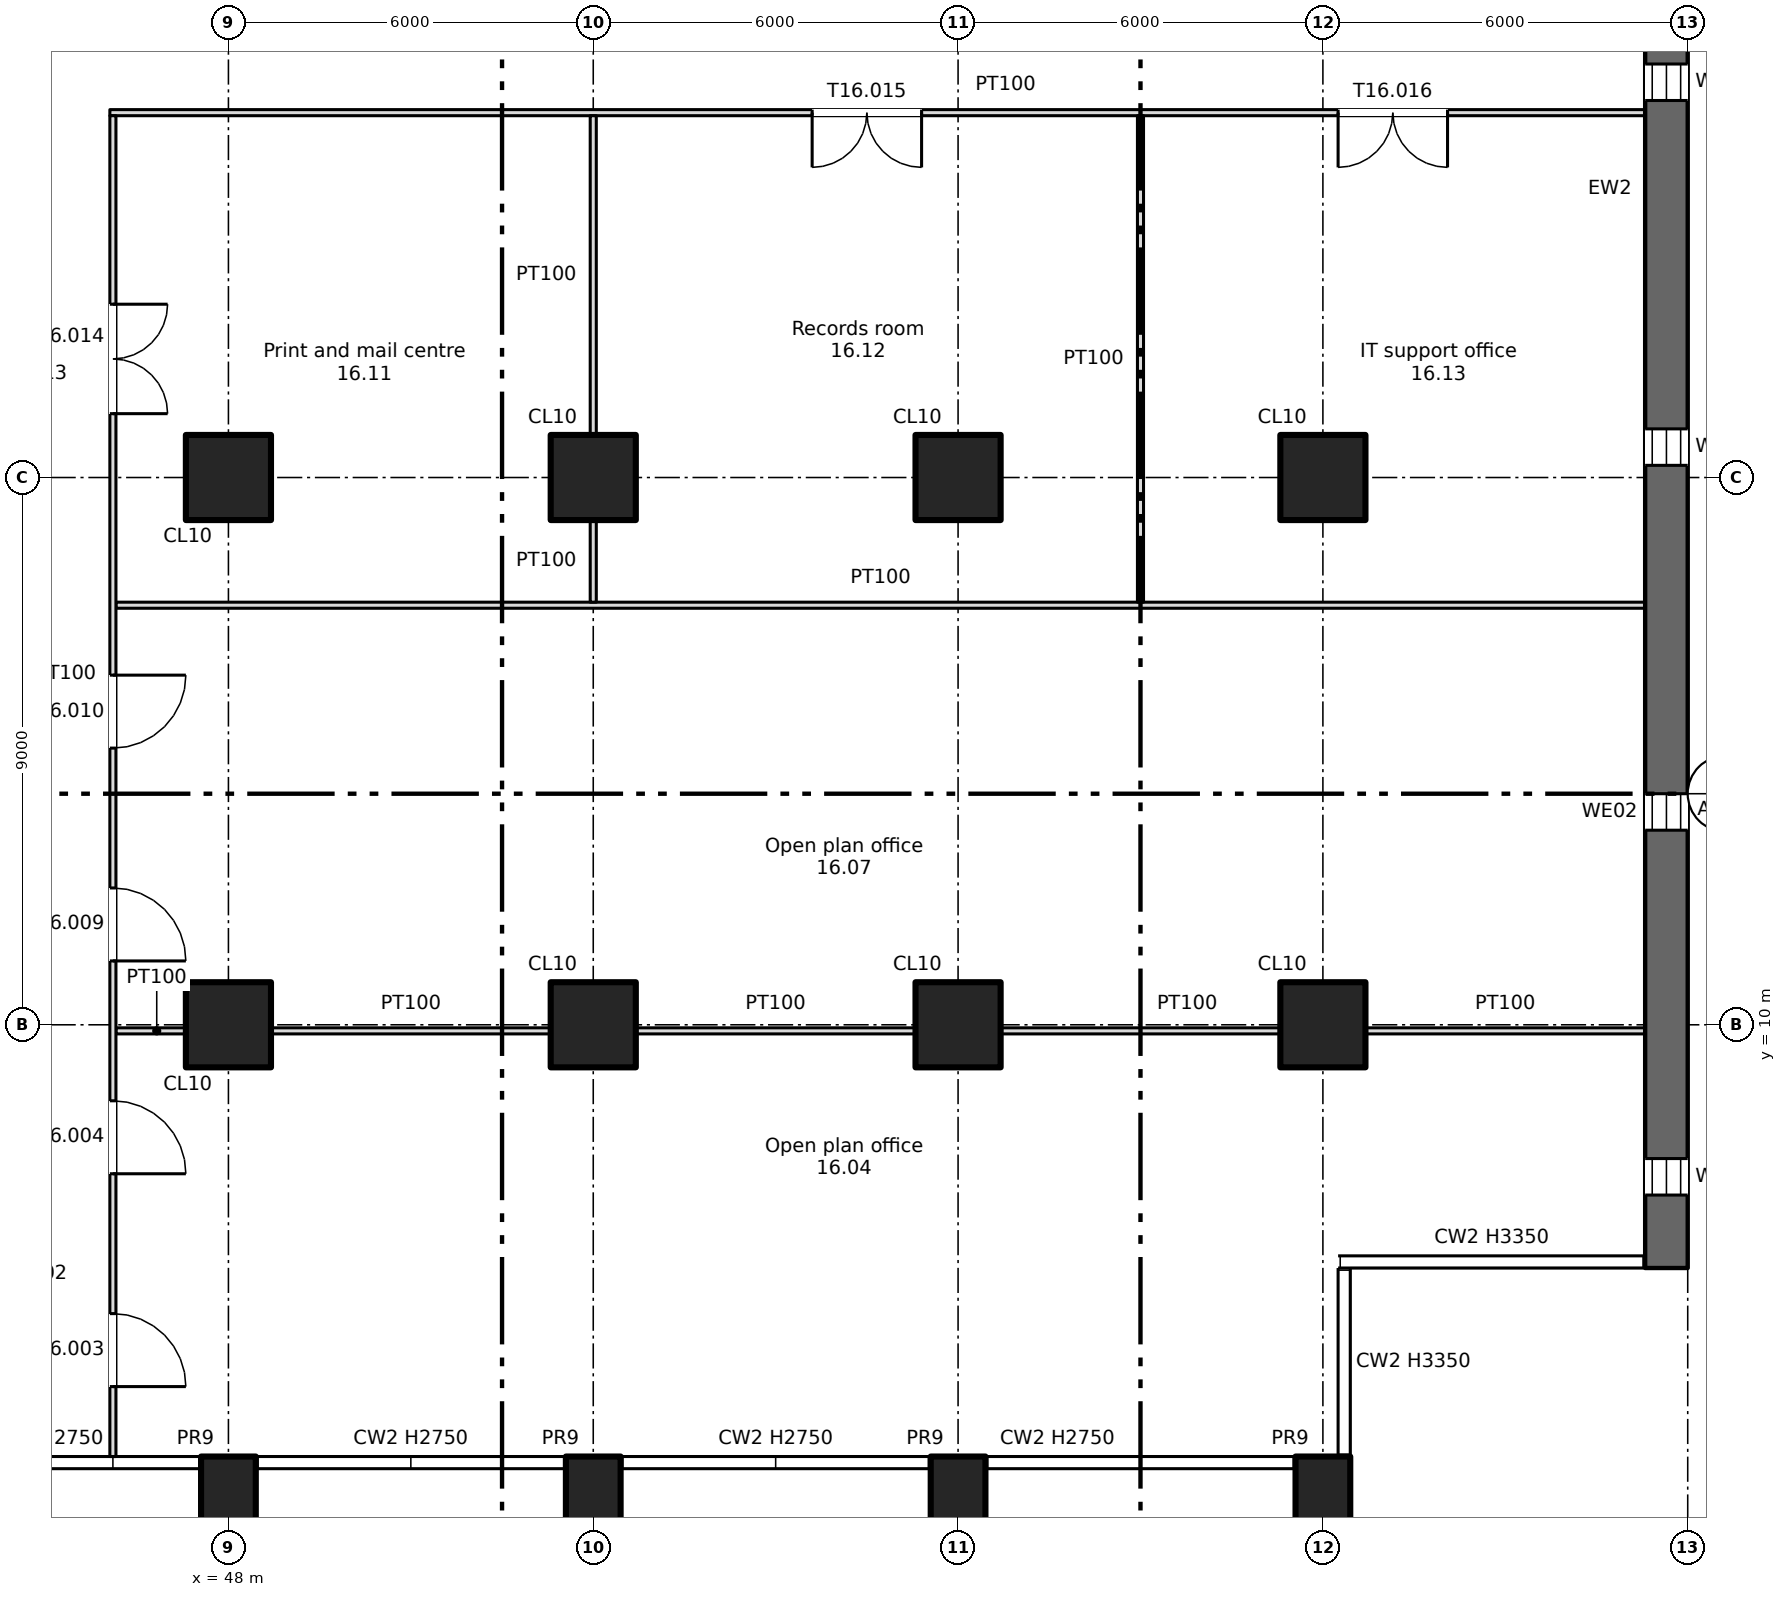
"""IFC4 building model, lengths in metres.
Left out: names, types, materials, properties, quantities, classifications, styles, units other than length and angle.
Written with IfcOpenShell. Run it as: python <this file> out.ifc"""

import sys

from ifc_helpers import new_model, si_unit, direction, frame, frame_2d, origin, origin_2d, place, context, subcontext, project, spatial, rectangle, extrude, element, fill, save


model = new_model("IFC4")
c1 = context("Model", 3, precision=1e-05, world=origin(), true_north=direction((0.0, 1.0)))
c2 = subcontext(c1, "Body", "Model", "MODEL_VIEW")
j1 = project(units=[si_unit("LENGTHUNIT", "METRE"), si_unit("PLANEANGLEUNIT", "RADIAN")], contexts=[c1])
p1 = place(None, origin())
s1 = spatial("IfcSite", under=j1, at=p1, CompositionType="ELEMENT")
p2 = place(p1, origin())
s2 = spatial("IfcBuilding", under=s1, at=p2, CompositionType="ELEMENT")
p3 = place(p2, frame((0.0, 0.0, 102.5)))
s3 = spatial("IfcBuildingStorey", under=s2, at=p3, CompositionType="ELEMENT", Elevation=102.5)
for number, where, z_axis, x_axis in (
    (1, (48.0, 2.2, -0.4), (0.0, 0.0, 1.0), (1.0, 0.0, 0.0)),
    (2, (54.0, 2.2, -0.4), (0.0, 0.0, 1.0), (1.0, 0.0, 0.0)),
    (3, (60.0, 2.2, -0.4), (0.0, 0.0, 1.0), (1.0, 0.0, 0.0)),
    (4, (66.0, 2.2, -0.4), (0.0, 0.0, 1.0), (1.0, 0.0, 0.0)),
):
    element("IfcColumn", number, at=place(p3, frame(where, z_axis=z_axis, x_axis=x_axis)), inside=s3, PredefinedType="COLUMN", context=c2, shape_type="SweptSolid", body=[
        extrude(rectangle(XDim=0.9, YDim=1.4, at=origin_2d()), origin(), (0.0, 0.0, 1.0), 3.75),
    ])
for number, where, z_axis, x_axis in (
    (5, (48.0, 10.0, 0.0), (0.0, 0.0, 1.0), (1.0, 0.0, 0.0)),
    (6, (48.0, 19.0, 0.0), (0.0, 0.0, 1.0), (1.0, 0.0, 0.0)),
    (7, (54.0, 10.0, 0.0), (0.0, 0.0, 1.0), (1.0, 0.0, 0.0)),
    (8, (54.0, 19.0, 0.0), (0.0, 0.0, 1.0), (1.0, 0.0, 0.0)),
    (9, (60.0, 10.0, 0.0), (0.0, 0.0, 1.0), (1.0, 0.0, 0.0)),
    (10, (60.0, 19.0, 0.0), (0.0, 0.0, 1.0), (1.0, 0.0, 0.0)),
    (11, (66.0, 10.0, 0.0), (0.0, 0.0, 1.0), (1.0, 0.0, 0.0)),
    (12, (66.0, 19.0, 0.0), (0.0, 0.0, 1.0), (1.0, 0.0, 0.0)),
):
    element("IfcColumn", number, at=place(p3, frame(where, z_axis=z_axis, x_axis=x_axis)), inside=s3, PredefinedType="COLUMN", context=c2, shape_type="SweptSolid", body=[
        extrude(rectangle(XDim=1.4, YDim=1.4, at=origin_2d()), origin(), (0.0, 0.0, 1.0), 3.35),
    ])
p4 = place(p3, frame((71.65, 6.0, 0.0), z_axis=(0.0, 0.0, 1.0), x_axis=(0.0, 1.0, 0.0)))
e13 = element("IfcWall", 13, at=p4, inside=s3, PredefinedType="SHEAR", context=c2, shape_type="SweptSolid", body=[
    extrude(rectangle(XDim=35.5, YDim=0.7, at=frame_2d((17.75, 0.0))), origin(), (0.0, 0.0, 1.0), 3.35),
])
p5 = place(p4, frame((1.2, 0.0, 0.6)))
e14 = element("IfcOpeningElement", 14, at=p5, cuts=e13, PredefinedType="OPENING", context=c2, shape_type="SweptSolid", body=[
    extrude(rectangle(XDim=0.6, YDim=2.4, at=frame_2d((0.3, 1.2))), frame((0.0, 0.36, 0.0), z_axis=(0.0, -1.0, 0.0), x_axis=(1.0, 0.0, 0.0)), (0.0, 0.0, 1.0), 0.72),
])
p6 = place(p4, frame((7.2, 0.0, 0.6)))
e15 = element("IfcOpeningElement", 15, at=p6, cuts=e13, PredefinedType="OPENING", context=c2, shape_type="SweptSolid", body=[
    extrude(rectangle(XDim=0.6, YDim=2.4, at=frame_2d((0.3, 1.2))), frame((0.0, 0.36, 0.0), z_axis=(0.0, -1.0, 0.0), x_axis=(1.0, 0.0, 0.0)), (0.0, 0.0, 1.0), 0.72),
])
p7 = place(p4, frame((13.2, 0.0, 0.6)))
e16 = element("IfcOpeningElement", 16, at=p7, cuts=e13, PredefinedType="OPENING", context=c2, shape_type="SweptSolid", body=[
    extrude(rectangle(XDim=0.6, YDim=2.4, at=frame_2d((0.3, 1.2))), frame((0.0, 0.36, 0.0), z_axis=(0.0, -1.0, 0.0), x_axis=(1.0, 0.0, 0.0)), (0.0, 0.0, 1.0), 0.72),
])
p8 = place(p4, frame((19.2, 0.0, 0.6)))
e17 = element("IfcOpeningElement", 17, at=p8, cuts=e13, PredefinedType="OPENING", context=c2, shape_type="SweptSolid", body=[
    extrude(rectangle(XDim=0.6, YDim=2.4, at=frame_2d((0.3, 1.2))), frame((0.0, 0.36, 0.0), z_axis=(0.0, -1.0, 0.0), x_axis=(1.0, 0.0, 0.0)), (0.0, 0.0, 1.0), 0.72),
])
p9 = place(p4, frame((25.2, 0.0, 0.6)))
e18 = element("IfcOpeningElement", 18, at=p9, cuts=e13, PredefinedType="OPENING", context=c2, shape_type="SweptSolid", body=[
    extrude(rectangle(XDim=0.6, YDim=2.4, at=frame_2d((0.3, 1.2))), frame((0.0, 0.36, 0.0), z_axis=(0.0, -1.0, 0.0), x_axis=(1.0, 0.0, 0.0)), (0.0, 0.0, 1.0), 0.72),
])
p10 = place(p4, frame((31.2, 0.0, 0.6)))
e19 = element("IfcOpeningElement", 19, at=p10, cuts=e13, PredefinedType="OPENING", context=c2, shape_type="SweptSolid", body=[
    extrude(rectangle(XDim=0.6, YDim=2.4, at=frame_2d((0.3, 1.2))), frame((0.0, 0.36, 0.0), z_axis=(0.0, -1.0, 0.0), x_axis=(1.0, 0.0, 0.0)), (0.0, 0.0, 1.0), 0.72),
])
for number, where, z_axis, x_axis in (
    (20, (66.7, 9.9, 0.0), (0.0, 0.0, 1.0), (1.0, 0.0, 0.0)),
    (21, (60.7, 9.9, 0.0), (0.0, 0.0, 1.0), (1.0, 0.0, 0.0)),
    (22, (54.7, 9.9, 0.0), (0.0, 0.0, 1.0), (1.0, 0.0, 0.0)),
    (23, (48.7, 9.9, 0.0), (0.0, 0.0, 1.0), (1.0, 0.0, 0.0)),
):
    element("IfcWall", number, at=place(p3, frame(where, z_axis=z_axis, x_axis=x_axis)), inside=s3, PredefinedType="PARTITIONING", context=c2, shape_type="SweptSolid", body=[
        extrude(rectangle(XDim=4.6, YDim=0.1, at=frame_2d((2.3, 0.0))), origin(), (0.0, 0.0, 1.0), 3.35),
    ])
p11 = place(p3, frame((46.15, 9.9, 0.0), z_axis=(0.0, 0.0, 1.0), x_axis=(1.0, 0.0, 0.0)))
e24 = element("IfcWall", 24, at=p11, inside=s3, PredefinedType="PARTITIONING", context=c2, shape_type="SweptSolid", body=[
    extrude(rectangle(XDim=1.15, YDim=0.1, at=frame_2d((0.575, 0.0))), origin(), (0.0, 0.0, 1.0), 3.35),
])
p12 = place(p3, frame((46.15, 16.9, 0.0), z_axis=(0.0, 0.0, 1.0), x_axis=(1.0, 0.0, 0.0)))
e25 = element("IfcWall", 25, at=p12, inside=s3, PredefinedType="PARTITIONING", context=c2, shape_type="SweptSolid", body=[
    extrude(rectangle(XDim=25.15, YDim=0.1, at=frame_2d((12.575, 0.0))), origin(), (0.0, 0.0, 1.0), 3.35),
])
p13 = place(p3, frame((46.05, 25.0, 0.0), z_axis=(0.0, 0.0, 1.0), x_axis=(1.0, 0.0, 0.0)))
e26 = element("IfcWall", 26, at=p13, inside=s3, PredefinedType="PARTITIONING", context=c2, shape_type="SweptSolid", body=[
    extrude(rectangle(XDim=25.25, YDim=0.1, at=frame_2d((12.625, 0.0))), origin(), (0.0, 0.0, 1.0), 3.35),
])
p14 = place(p13, frame((11.55, 0.0, 0.0)))
e27 = element("IfcOpeningElement", 27, at=p14, cuts=e26, PredefinedType="OPENING", context=c2, shape_type="SweptSolid", body=[
    extrude(rectangle(XDim=1.8, YDim=2.1, at=frame_2d((0.9, 1.05))), frame((0.0, 0.06, 0.0), z_axis=(0.0, -1.0, 0.0), x_axis=(1.0, 0.0, 0.0)), (0.0, 0.0, 1.0), 0.12),
])
p15 = place(p13, frame((20.2, 0.0, 0.0)))
e28 = element("IfcOpeningElement", 28, at=p15, cuts=e26, PredefinedType="OPENING", context=c2, shape_type="SweptSolid", body=[
    extrude(rectangle(XDim=1.8, YDim=2.1, at=frame_2d((0.9, 1.05))), frame((0.0, 0.06, 0.0), z_axis=(0.0, -1.0, 0.0), x_axis=(1.0, 0.0, 0.0)), (0.0, 0.0, 1.0), 0.12),
])
p16 = place(p3, frame((46.1, 2.9, 0.0), z_axis=(0.0, 0.0, 1.0), x_axis=(0.0, 1.0, 0.0)))
e29 = element("IfcWall", 29, at=p16, inside=s3, PredefinedType="PARTITIONING", context=c2, shape_type="SweptSolid", body=[
    extrude(rectangle(XDim=22.05, YDim=0.1, at=frame_2d((11.025, 0.0))), origin(), (0.0, 0.0, 1.0), 3.35),
])
p17 = place(p16, frame((1.15, 0.0, 0.0)))
e30 = element("IfcOpeningElement", 30, at=p17, cuts=e29, PredefinedType="OPENING", context=c2, shape_type="SweptSolid", body=[
    extrude(rectangle(XDim=1.2, YDim=2.1, at=frame_2d((0.6, 1.05))), frame((0.0, 0.06, 0.0), z_axis=(0.0, -1.0, 0.0), x_axis=(1.0, 0.0, 0.0)), (0.0, 0.0, 1.0), 0.12),
])
p18 = place(p16, frame((4.65, 0.0, 0.0)))
e31 = element("IfcOpeningElement", 31, at=p18, cuts=e29, PredefinedType="OPENING", context=c2, shape_type="SweptSolid", body=[
    extrude(rectangle(XDim=1.2, YDim=2.1, at=frame_2d((0.6, 1.05))), frame((0.0, 0.06, 0.0), z_axis=(0.0, -1.0, 0.0), x_axis=(1.0, 0.0, 0.0)), (0.0, 0.0, 1.0), 0.12),
])
p19 = place(p16, frame((8.15, 0.0, 0.0)))
e32 = element("IfcOpeningElement", 32, at=p19, cuts=e29, PredefinedType="OPENING", context=c2, shape_type="SweptSolid", body=[
    extrude(rectangle(XDim=1.2, YDim=2.1, at=frame_2d((0.6, 1.05))), frame((0.0, 0.06, 0.0), z_axis=(0.0, -1.0, 0.0), x_axis=(1.0, 0.0, 0.0)), (0.0, 0.0, 1.0), 0.12),
])
p20 = place(p16, frame((11.65, 0.0, 0.0)))
e33 = element("IfcOpeningElement", 33, at=p20, cuts=e29, PredefinedType="OPENING", context=c2, shape_type="SweptSolid", body=[
    extrude(rectangle(XDim=1.2, YDim=2.1, at=frame_2d((0.6, 1.05))), frame((0.0, 0.06, 0.0), z_axis=(0.0, -1.0, 0.0), x_axis=(1.0, 0.0, 0.0)), (0.0, 0.0, 1.0), 0.12),
])
p21 = place(p16, frame((17.15, 0.0, 0.0)))
e34 = element("IfcOpeningElement", 34, at=p21, cuts=e29, PredefinedType="OPENING", context=c2, shape_type="SweptSolid", body=[
    extrude(rectangle(XDim=1.8, YDim=2.1, at=frame_2d((0.9, 1.05))), frame((0.0, 0.06, 0.0), z_axis=(0.0, -1.0, 0.0), x_axis=(1.0, 0.0, 0.0)), (0.0, 0.0, 1.0), 0.12),
])
p22 = place(p3, frame((54.0, 16.95, 0.0), z_axis=(0.0, 0.0, 1.0), x_axis=(0.0, 1.0, 0.0)))
e35 = element("IfcWall", 35, at=p22, inside=s3, PredefinedType="PARTITIONING", context=c2, shape_type="SweptSolid", body=[
    extrude(rectangle(XDim=1.35, YDim=0.1, at=frame_2d((0.675, 0.0))), origin(), (0.0, 0.0, 1.0), 3.35),
])
p23 = place(p3, frame((54.0, 19.7, 0.0), z_axis=(0.0, 0.0, 1.0), x_axis=(0.0, 1.0, 0.0)))
e36 = element("IfcWall", 36, at=p23, inside=s3, PredefinedType="PARTITIONING", context=c2, shape_type="SweptSolid", body=[
    extrude(rectangle(XDim=5.25, YDim=0.1, at=frame_2d((2.625, 0.0))), origin(), (0.0, 0.0, 1.0), 3.35),
])
p24 = place(p3, frame((63.0, 16.95, 0.0), z_axis=(0.0, 0.0, 1.0), x_axis=(0.0, 1.0, 0.0)))
e37 = element("IfcWall", 37, at=p24, inside=s3, PredefinedType="PARTITIONING", context=c2, shape_type="SweptSolid", body=[
    extrude(rectangle(XDim=8.0, YDim=0.1, at=frame_2d((4.0, 0.0))), origin(), (0.0, 0.0, 1.0), 3.35),
])
p25 = place(p5, origin())
e38 = element("IfcWindow", 38, at=p25, inside=s3, PartitioningType="SINGLE_PANEL", PredefinedType="WINDOW", context=c2, shape_type="SweptSolid", body=[
    extrude(rectangle(XDim=0.6, YDim=2.4, at=frame_2d((0.3, 1.2))), frame((0.0, 0.03, 0.0), z_axis=(0.0, -1.0, 0.0), x_axis=(1.0, 0.0, 0.0)), (0.0, 0.0, 1.0), 0.06),
])
fill(e14, e38)
p26 = place(p6, origin())
e39 = element("IfcWindow", 39, at=p26, inside=s3, PartitioningType="SINGLE_PANEL", PredefinedType="WINDOW", context=c2, shape_type="SweptSolid", body=[
    extrude(rectangle(XDim=0.6, YDim=2.4, at=frame_2d((0.3, 1.2))), frame((0.0, 0.03, 0.0), z_axis=(0.0, -1.0, 0.0), x_axis=(1.0, 0.0, 0.0)), (0.0, 0.0, 1.0), 0.06),
])
fill(e15, e39)
p27 = place(p7, origin())
e40 = element("IfcWindow", 40, at=p27, inside=s3, PartitioningType="SINGLE_PANEL", PredefinedType="WINDOW", context=c2, shape_type="SweptSolid", body=[
    extrude(rectangle(XDim=0.6, YDim=2.4, at=frame_2d((0.3, 1.2))), frame((0.0, 0.03, 0.0), z_axis=(0.0, -1.0, 0.0), x_axis=(1.0, 0.0, 0.0)), (0.0, 0.0, 1.0), 0.06),
])
fill(e16, e40)
p28 = place(p8, origin())
e41 = element("IfcWindow", 41, at=p28, inside=s3, PartitioningType="SINGLE_PANEL", PredefinedType="WINDOW", context=c2, shape_type="SweptSolid", body=[
    extrude(rectangle(XDim=0.6, YDim=2.4, at=frame_2d((0.3, 1.2))), frame((0.0, 0.03, 0.0), z_axis=(0.0, -1.0, 0.0), x_axis=(1.0, 0.0, 0.0)), (0.0, 0.0, 1.0), 0.06),
])
fill(e17, e41)
p29 = place(p17, origin())
e42 = element("IfcDoor", 42, at=p29, inside=s3, OperationType="SINGLE_SWING_LEFT", PredefinedType="DOOR", context=c2, shape_type="SweptSolid", body=[
    extrude(rectangle(XDim=1.2, YDim=2.1, at=frame_2d((0.6, 1.05))), frame((0.0, 0.025, 0.0), z_axis=(0.0, -1.0, 0.0), x_axis=(1.0, 0.0, 0.0)), (0.0, 0.0, 1.0), 0.05),
])
fill(e30, e42)
p30 = place(p18, origin())
e43 = element("IfcDoor", 43, at=p30, inside=s3, OperationType="SINGLE_SWING_LEFT", PredefinedType="DOOR", context=c2, shape_type="SweptSolid", body=[
    extrude(rectangle(XDim=1.2, YDim=2.1, at=frame_2d((0.6, 1.05))), frame((0.0, 0.025, 0.0), z_axis=(0.0, -1.0, 0.0), x_axis=(1.0, 0.0, 0.0)), (0.0, 0.0, 1.0), 0.05),
])
fill(e31, e43)
p31 = place(p19, origin())
e44 = element("IfcDoor", 44, at=p31, inside=s3, OperationType="SINGLE_SWING_LEFT", PredefinedType="DOOR", context=c2, shape_type="SweptSolid", body=[
    extrude(rectangle(XDim=1.2, YDim=2.1, at=frame_2d((0.6, 1.05))), frame((0.0, 0.025, 0.0), z_axis=(0.0, -1.0, 0.0), x_axis=(1.0, 0.0, 0.0)), (0.0, 0.0, 1.0), 0.05),
])
fill(e32, e44)
p32 = place(p20, origin())
e45 = element("IfcDoor", 45, at=p32, inside=s3, OperationType="SINGLE_SWING_RIGHT", PredefinedType="DOOR", context=c2, shape_type="SweptSolid", body=[
    extrude(rectangle(XDim=1.2, YDim=2.1, at=frame_2d((0.6, 1.05))), frame((0.0, 0.025, 0.0), z_axis=(0.0, -1.0, 0.0), x_axis=(1.0, 0.0, 0.0)), (0.0, 0.0, 1.0), 0.05),
])
fill(e33, e45)
p33 = place(p21, origin())
e46 = element("IfcDoor", 46, at=p33, inside=s3, OperationType="DOUBLE_DOOR_SINGLE_SWING", PredefinedType="DOOR", context=c2, shape_type="SweptSolid", body=[
    extrude(rectangle(XDim=1.8, YDim=2.1, at=frame_2d((0.9, 1.05))), frame((0.0, 0.025, 0.0), z_axis=(0.0, -1.0, 0.0), x_axis=(1.0, 0.0, 0.0)), (0.0, 0.0, 1.0), 0.05),
])
fill(e34, e46)
p34 = place(p14, origin())
e47 = element("IfcDoor", 47, at=p34, inside=s3, OperationType="DOUBLE_DOOR_SINGLE_SWING", PredefinedType="DOOR", context=c2, shape_type="SweptSolid", body=[
    extrude(rectangle(XDim=1.8, YDim=2.1, at=frame_2d((0.9, 1.05))), frame((0.0, 0.025, 0.0), z_axis=(0.0, -1.0, 0.0), x_axis=(1.0, 0.0, 0.0)), (0.0, 0.0, 1.0), 0.05),
])
fill(e27, e47)
p35 = place(p15, origin())
e48 = element("IfcDoor", 48, at=p35, inside=s3, OperationType="DOUBLE_DOOR_SINGLE_SWING", PredefinedType="DOOR", context=c2, shape_type="SweptSolid", body=[
    extrude(rectangle(XDim=1.8, YDim=2.1, at=frame_2d((0.9, 1.05))), frame((0.0, 0.025, 0.0), z_axis=(0.0, -1.0, 0.0), x_axis=(1.0, 0.0, 0.0)), (0.0, 0.0, 1.0), 0.05),
])
fill(e28, e48)
save(model, sys.argv[1])
